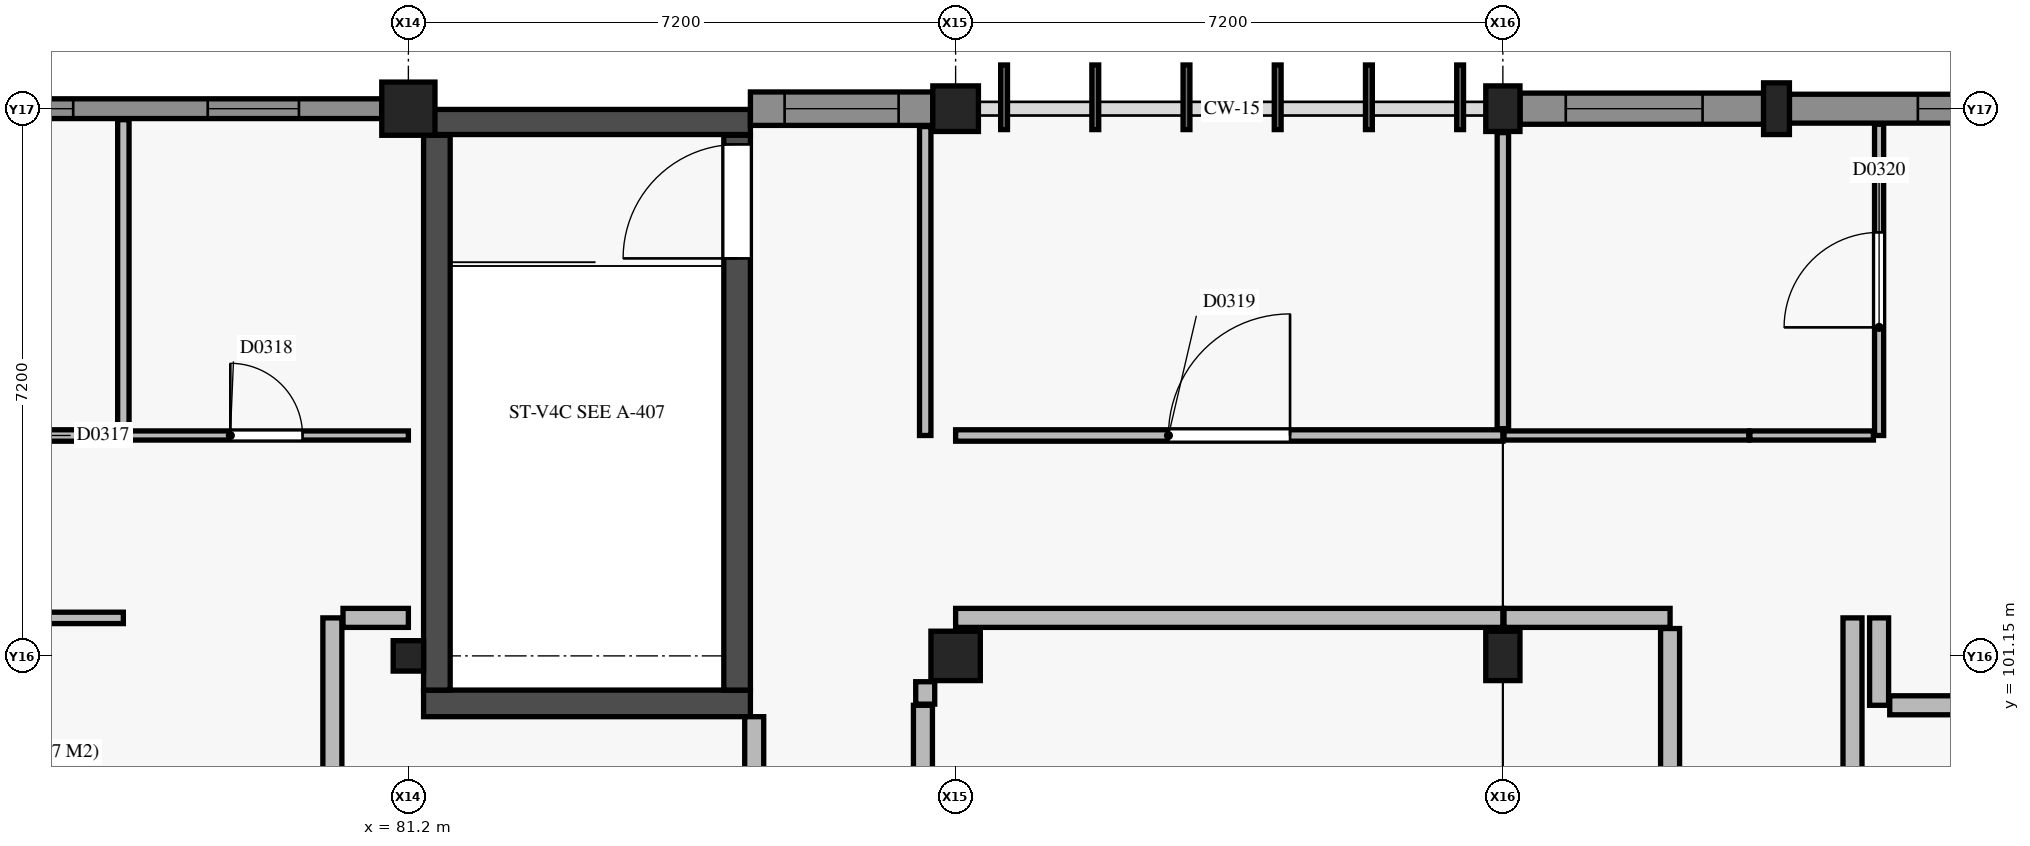
"""IFC4 building model, lengths in metres.
Left out: names, types, materials, properties, quantities, classifications, styles, units other than length and angle.
Written with IfcOpenShell. Run it as: python <this file> out.ifc"""

import sys

from ifc_helpers import new_model, si_unit, direction, frame, frame_2d, origin, origin_2d, place, context, subcontext, project, spatial, rectangle, circle, extrude, element, fill, save


model = new_model("IFC4")
c1 = context("Model", 3, precision=1e-05, world=origin(), true_north=direction((0.0, 1.0)))
c2 = subcontext(c1, "Body", "Model", "MODEL_VIEW")
j1 = project(units=[si_unit("LENGTHUNIT", "METRE"), si_unit("PLANEANGLEUNIT", "RADIAN")], contexts=[c1])
p1 = place(None, origin())
s1 = spatial("IfcSite", under=j1, at=p1, CompositionType="ELEMENT")
p2 = place(p1, origin())
s2 = spatial("IfcBuilding", under=s1, at=p2, CompositionType="ELEMENT")
p3 = place(p2, frame((0.0, 0.0, 21.6)))
s3 = spatial("IfcBuildingStorey", under=s2, at=p3, CompositionType="ELEMENT", Elevation=21.6)
p4 = place(p3, frame((81.2, 101.15, 0.0), z_axis=(0.0, 0.0, 1.0), x_axis=(1.0, 0.0, 0.0)))
e1 = element("IfcColumn", 1, at=p4, inside=s3, PredefinedType="COLUMN", context=c2, shape_type="SweptSolid", body=[
    extrude(rectangle(XDim=0.4, YDim=0.4, at=origin_2d()), origin(), (0.0, 0.0, 1.0), 4.05),
])
p5 = place(p3, frame((81.2, 108.35, 0.0), z_axis=(0.0, 0.0, 1.0), x_axis=(1.0, 0.0, 0.0)))
e2 = element("IfcColumn", 2, at=p5, inside=s3, PredefinedType="COLUMN", context=c2, shape_type="SweptSolid", body=[
    extrude(circle(Radius=0.35, at=origin_2d()), origin(), (0.0, 0.0, 1.0), 4.36),
])
p6 = place(p3, frame((88.4, 101.15, 0.0), z_axis=(0.0, 0.0, 1.0), x_axis=(1.0, 0.0, 0.0)))
e3 = element("IfcColumn", 3, at=p6, inside=s3, PredefinedType="COLUMN", context=c2, shape_type="SweptSolid", body=[
    extrude(rectangle(XDim=0.65, YDim=0.65, at=origin_2d()), origin(), (0.0, 0.0, 1.0), 4.05),
])
p7 = place(p3, frame((88.4, 108.35, 0.0), z_axis=(0.0, 0.0, 1.0), x_axis=(1.0, 0.0, 0.0)))
e4 = element("IfcColumn", 4, at=p7, inside=s3, PredefinedType="COLUMN", context=c2, shape_type="SweptSolid", body=[
    extrude(rectangle(XDim=0.6, YDim=0.6, at=origin_2d()), origin(), (0.0, 0.0, 1.0), 4.36),
])
p8 = place(p3, frame((95.6, 101.15, 0.0), z_axis=(0.0, 0.0, 1.0), x_axis=(1.0, 0.0, 0.0)))
e5 = element("IfcColumn", 5, at=p8, inside=s3, PredefinedType="COLUMN", context=c2, shape_type="SweptSolid", body=[
    extrude(rectangle(XDim=0.45, YDim=0.65, at=origin_2d()), origin(), (0.0, 0.0, 1.0), 4.05),
])
p9 = place(p3, frame((95.6, 108.35, 0.0), z_axis=(0.0, 0.0, 1.0), x_axis=(1.0, 0.0, 0.0)))
e6 = element("IfcColumn", 6, at=p9, inside=s3, PredefinedType="COLUMN", context=c2, shape_type="SweptSolid", body=[
    extrude(rectangle(XDim=0.45, YDim=0.6, at=origin_2d()), origin(), (0.0, 0.0, 1.0), 4.36),
])
p10 = place(p3, frame((99.2, 108.35, 0.0), z_axis=(0.0, 0.0, 1.0), x_axis=(1.0, 0.0, 0.0)))
e7 = element("IfcColumn", 7, at=p10, inside=s3, PredefinedType="PILASTER", context=c2, shape_type="SweptSolid", body=[
    extrude(rectangle(XDim=0.34, YDim=0.68, at=origin_2d()), origin(), (0.0, 0.0, 1.0), 4.2),
])
p11 = place(p3, frame((81.4, 100.525, 0.0), z_axis=(0.0, 0.0, 1.0), x_axis=(1.0, 0.0, 0.0)))
e8 = element("IfcWall", 8, at=p11, inside=s3, PredefinedType="SHEAR", context=c2, shape_type="SweptSolid", body=[
    extrude(rectangle(XDim=4.3, YDim=0.35, at=frame_2d((2.15, 0.0))), origin(), (0.0, 0.0, 1.0), 4.02),
])
p12 = place(p3, frame((81.4, 108.175, 0.0), z_axis=(0.0, 0.0, 1.0), x_axis=(1.0, 0.0, 0.0)))
e9 = element("IfcWall", 9, at=p12, inside=s3, PredefinedType="SHEAR", context=c2, shape_type="SweptSolid", body=[
    extrude(rectangle(XDim=4.3, YDim=0.33, at=frame_2d((2.15, 0.0))), origin(), (0.0, 0.0, 1.0), 4.02),
])
p13 = place(p3, frame((81.575, 100.7, 0.0), z_axis=(0.0, 0.0, 1.0), x_axis=(0.0, 1.0, 0.0)))
e10 = element("IfcWall", 10, at=p13, inside=s3, PredefinedType="SHEAR", context=c2, shape_type="SweptSolid", body=[
    extrude(rectangle(XDim=7.3, YDim=0.35, at=frame_2d((3.65, 0.0))), origin(), (0.0, 0.0, 1.0), 4.02),
])
p14 = place(p3, frame((85.525, 100.7, 0.0), z_axis=(0.0, 0.0, 1.0), x_axis=(0.0, 1.0, 0.0)))
e11 = element("IfcWall", 11, at=p14, inside=s3, PredefinedType="SHEAR", context=c2, shape_type="SweptSolid", body=[
    extrude(rectangle(XDim=7.3, YDim=0.35, at=frame_2d((3.65, 0.0))), origin(), (0.0, 0.0, 1.0), 4.02),
])
p15 = place(p14, frame((5.68, 0.0, 0.0)))
e12 = element("IfcOpeningElement", 12, at=p15, cuts=e11, PredefinedType="OPENING", context=c2, shape_type="SweptSolid", body=[
    extrude(rectangle(XDim=1.5, YDim=2.15, at=frame_2d((0.75, 1.075))), frame((0.0, 0.185, 0.0), z_axis=(0.0, -1.0, 0.0), x_axis=(1.0, 0.0, 0.0)), (0.0, 0.0, 1.0), 0.37),
])
p16 = place(p3, frame((74.35, 108.35, 0.0), z_axis=(0.0, 0.0, 1.0), x_axis=(1.0, 0.0, 0.0)))
e13 = element("IfcWall", 13, at=p16, inside=s3, PredefinedType="SOLIDWALL", context=c2, shape_type="SweptSolid", body=[
    extrude(rectangle(XDim=6.5, YDim=0.26, at=frame_2d((3.25, 0.0))), origin(), (0.0, 0.0, 1.0), 3.38),
])
p17 = place(p16, frame((0.64, 0.0, 0.9)))
e14 = element("IfcOpeningElement", 14, at=p17, cuts=e13, PredefinedType="OPENING", context=c2, shape_type="SweptSolid", body=[
    extrude(rectangle(XDim=1.8, YDim=1.8, at=frame_2d((0.9, 0.9))), frame((0.0, 0.14, 0.0), z_axis=(0.0, -1.0, 0.0), x_axis=(1.0, 0.0, 0.0)), (0.0, 0.0, 1.0), 0.28),
])
p18 = place(p16, frame((4.21, 0.0, 0.9)))
e15 = element("IfcOpeningElement", 15, at=p18, cuts=e13, PredefinedType="OPENING", context=c2, shape_type="SweptSolid", body=[
    extrude(rectangle(XDim=1.2, YDim=1.5, at=frame_2d((0.6, 0.75))), frame((0.0, 0.14, 0.0), z_axis=(0.0, -1.0, 0.0), x_axis=(1.0, 0.0, 0.0)), (0.0, 0.0, 1.0), 0.28),
])
p19 = place(p3, frame((85.7, 108.35, 0.0), z_axis=(0.0, 0.0, 1.0), x_axis=(1.0, 0.0, 0.0)))
e16 = element("IfcWall", 16, at=p19, inside=s3, PredefinedType="USERDEFINED", context=c2, shape_type="SweptSolid", body=[
    extrude(rectangle(XDim=2.4, YDim=0.44, at=frame_2d((1.2, 0.0))), origin(), (0.0, 0.0, 1.0), 3.3),
])
p20 = place(p19, frame((0.45, 0.0, 0.9)))
e17 = element("IfcOpeningElement", 17, at=p20, cuts=e16, PredefinedType="OPENING", context=c2, shape_type="SweptSolid", body=[
    extrude(rectangle(XDim=1.5, YDim=1.5, at=frame_2d((0.75, 0.75))), frame((0.0, 0.23, 0.0), z_axis=(0.0, -1.0, 0.0), x_axis=(1.0, 0.0, 0.0)), (0.0, 0.0, 1.0), 0.46),
])
p21 = place(p3, frame((95.825, 108.35, 0.0), z_axis=(0.0, 0.0, 1.0), x_axis=(1.0, 0.0, 0.0)))
e18 = element("IfcWall", 18, at=p21, inside=s3, PredefinedType="USERDEFINED", context=c2, shape_type="SweptSolid", body=[
    extrude(rectangle(XDim=3.205, YDim=0.41, at=frame_2d((1.603, 0.0))), origin(), (0.0, 0.0, 1.0), 3.38),
])
p22 = place(p21, frame((0.603, 0.0, 0.9)))
e19 = element("IfcOpeningElement", 19, at=p22, cuts=e18, PredefinedType="OPENING", context=c2, shape_type="SweptSolid", body=[
    extrude(rectangle(XDim=1.8, YDim=1.5, at=frame_2d((0.9, 0.75))), frame((0.0, 0.215, 0.0), z_axis=(0.0, -1.0, 0.0), x_axis=(1.0, 0.0, 0.0)), (0.0, 0.0, 1.0), 0.43),
])
p23 = place(p3, frame((99.37, 108.35, 0.0), z_axis=(0.0, 0.0, 1.0), x_axis=(1.0, 0.0, 0.0)))
e20 = element("IfcWall", 20, at=p23, inside=s3, PredefinedType="USERDEFINED", context=c2, shape_type="SweptSolid", body=[
    extrude(rectangle(XDim=3.08, YDim=0.38, at=frame_2d((1.54, 0.0))), origin(), (0.0, 0.0, 1.0), 3.38),
])
p24 = place(p23, frame((1.69, 0.0, 0.95)))
e21 = element("IfcOpeningElement", 21, at=p24, cuts=e20, PredefinedType="OPENING", context=c2, shape_type="SweptSolid", body=[
    extrude(rectangle(XDim=0.9, YDim=1.2, at=frame_2d((0.45, 0.6))), frame((0.0, 0.2, 0.0), z_axis=(0.0, -1.0, 0.0), x_axis=(1.0, 0.0, 0.0)), (0.0, 0.0, 1.0), 0.4),
])
p25 = place(p3, frame((87.97, 99.365, 0.0), z_axis=(0.0, 0.0, 1.0), x_axis=(0.0, 1.0, 0.0)))
e22 = element("IfcWall", 22, at=p25, inside=s3, PredefinedType="PARTITIONING", context=c2, shape_type="SweptSolid", body=[
    extrude(rectangle(XDim=1.135, YDim=0.25, at=frame_2d((0.567, 0.0))), origin(), (0.0, 0.0, 1.0), 3.95),
])
p26 = place(p3, frame((88.0, 100.515, 0.0), z_axis=(0.0, 0.0, 1.0), x_axis=(0.0, 1.0, 0.0)))
e23 = element("IfcWall", 23, at=p26, inside=s3, PredefinedType="PARTITIONING", context=c2, shape_type="SweptSolid", body=[
    extrude(rectangle(XDim=0.295, YDim=0.25, at=frame_2d((0.147, 0.0))), origin(), (0.0, 0.0, 1.0), 3.95),
])
p27 = place(p3, frame((88.4, 101.65, 0.0), z_axis=(0.0, 0.0, 1.0), x_axis=(1.0, 0.0, 0.0)))
e24 = element("IfcWall", 24, at=p27, inside=s3, PredefinedType="PARTITIONING", context=c2, shape_type="SweptSolid", body=[
    extrude(rectangle(XDim=7.2, YDim=0.25, at=frame_2d((3.6, 0.0))), origin(), (0.0, 0.0, 1.0), 3.32),
])
p28 = place(p3, frame((95.615, 101.65, 0.0), z_axis=(0.0, 0.0, 1.0), x_axis=(1.0, 0.0, 0.0)))
e25 = element("IfcWall", 25, at=p28, inside=s3, PredefinedType="PARTITIONING", context=c2, shape_type="SweptSolid", body=[
    extrude(rectangle(XDim=2.185, YDim=0.25, at=frame_2d((1.093, 0.0))), origin(), (0.0, 0.0, 1.0), 3.32),
])
p29 = place(p3, frame((97.8, 98.75, 0.0), z_axis=(0.0, 0.0, 1.0), x_axis=(0.0, 1.0, 0.0)))
e26 = element("IfcWall", 26, at=p29, inside=s3, PredefinedType="PARTITIONING", context=c2, shape_type="SweptSolid", body=[
    extrude(rectangle(XDim=2.76, YDim=0.25, at=frame_2d((1.38, 0.0))), origin(), (0.0, 0.0, 1.0), 3.44),
])
p30 = place(p3, frame((85.75, 91.55, 0.0), z_axis=(0.0, 0.0, 1.0), x_axis=(0.0, 1.0, 0.0)))
e27 = element("IfcWall", 27, at=p30, inside=s3, PredefinedType="PARTITIONING", context=c2, shape_type="SweptSolid", body=[
    extrude(rectangle(XDim=8.8, YDim=0.25, at=frame_2d((4.4, 0.0))), origin(), (0.0, 0.0, 1.0), 3.5),
])
p31 = place(p3, frame((80.2, 91.69, 0.0), z_axis=(0.0, 0.0, 1.0), x_axis=(0.0, 1.0, 0.0)))
e28 = element("IfcWall", 28, at=p31, inside=s3, PredefinedType="PARTITIONING", context=c2, shape_type="SweptSolid", body=[
    extrude(rectangle(XDim=9.96, YDim=0.25, at=frame_2d((4.98, 0.0))), origin(), (0.0, 0.0, 1.0), 3.3),
])
p32 = place(p31, frame((3.98, 0.0, 0.0)))
e29 = element("IfcOpeningElement", 29, at=p32, cuts=e28, PredefinedType="OPENING", context=c2, shape_type="SweptSolid", body=[
    extrude(rectangle(XDim=2.0, YDim=2.4, at=frame_2d((1.0, 1.2))), frame((0.0, 0.135, 0.0), z_axis=(0.0, -1.0, 0.0), x_axis=(1.0, 0.0, 0.0)), (0.0, 0.0, 1.0), 0.27),
])
p33 = place(p3, frame((80.34, 101.65, 0.0), z_axis=(0.0, 0.0, 1.0), x_axis=(1.0, 0.0, 0.0)))
e30 = element("IfcWall", 30, at=p33, inside=s3, PredefinedType="PARTITIONING", context=c2, shape_type="SweptSolid", body=[
    extrude(rectangle(XDim=0.86, YDim=0.25, at=frame_2d((0.43, 0.0))), origin(), (0.0, 0.0, 1.0), 3.44),
])
p34 = place(p3, frame((100.55, 100.5, 0.0), z_axis=(0.0, 0.0, 1.0), x_axis=(0.0, 1.0, 0.0)))
e31 = element("IfcWall", 31, at=p34, inside=s3, PredefinedType="PARTITIONING", context=c2, shape_type="SweptSolid", body=[
    extrude(rectangle(XDim=1.15, YDim=0.25, at=frame_2d((0.575, 0.0))), origin(), (0.0, 0.0, 1.0), 3.44),
])
p35 = place(p3, frame((100.69, 100.5, 0.0), z_axis=(0.0, 0.0, 1.0), x_axis=(1.0, 0.0, 0.0)))
e32 = element("IfcWall", 32, at=p35, inside=s3, PredefinedType="PARTITIONING", context=c2, shape_type="SweptSolid", body=[
    extrude(rectangle(XDim=2.11, YDim=0.25, at=frame_2d((1.055, 0.0))), origin(), (0.0, 0.0, 1.0), 3.32),
])
p36 = place(p3, frame((100.2, 98.89, 0.0), z_axis=(0.0, 0.0, 1.0), x_axis=(0.0, 1.0, 0.0)))
e33 = element("IfcWall", 33, at=p36, inside=s3, PredefinedType="PARTITIONING", context=c2, shape_type="SweptSolid", body=[
    extrude(rectangle(XDim=2.76, YDim=0.25, at=frame_2d((1.38, 0.0))), origin(), (0.0, 0.0, 1.0), 3.44),
])
p37 = place(p3, frame((74.015, 101.65, 0.0), z_axis=(0.0, 0.0, 1.0), x_axis=(1.0, 0.0, 0.0)))
e34 = element("IfcWall", 34, at=p37, inside=s3, PredefinedType="PARTITIONING", context=c2, shape_type="SweptSolid", body=[
    extrude(rectangle(XDim=3.435, YDim=0.15, at=frame_2d((1.718, 0.0))), origin(), (0.0, 0.0, 1.0), 3.22),
])
p38 = place(p3, frame((74.015, 104.05, 0.0), z_axis=(0.0, 0.0, 1.0), x_axis=(1.0, 0.0, 0.0)))
e35 = element("IfcWall", 35, at=p38, inside=s3, PredefinedType="PARTITIONING", context=c2, shape_type="SweptSolid", body=[
    extrude(rectangle(XDim=3.435, YDim=0.15, at=frame_2d((1.718, 0.0))), origin(), (0.0, 0.0, 1.0), 3.22),
])
p39 = place(p38, frame((1.218, 0.0, 0.0)))
e36 = element("IfcOpeningElement", 36, at=p39, cuts=e35, PredefinedType="OPENING", context=c2, shape_type="SweptSolid", body=[
    extrude(rectangle(XDim=1.0, YDim=2.15, at=frame_2d((0.5, 1.075))), frame((0.0, 0.085, 0.0), z_axis=(0.0, -1.0, 0.0), x_axis=(1.0, 0.0, 0.0)), (0.0, 0.0, 1.0), 0.17),
])
p40 = place(p3, frame((88.0, 104.05, 0.0), z_axis=(0.0, 0.0, 1.0), x_axis=(0.0, 1.0, 0.0)))
e37 = element("IfcWall", 37, at=p40, inside=s3, PredefinedType="PARTITIONING", context=c2, shape_type="SweptSolid", body=[
    extrude(rectangle(XDim=4.065, YDim=0.15, at=frame_2d((2.032, 0.0))), origin(), (0.0, 0.0, 1.0), 3.95),
])
p41 = place(p3, frame((88.4, 104.05, 0.0), z_axis=(0.0, 0.0, 1.0), x_axis=(1.0, 0.0, 0.0)))
e38 = element("IfcWall", 38, at=p41, inside=s3, PredefinedType="PARTITIONING", context=c2, shape_type="SweptSolid", body=[
    extrude(rectangle(XDim=7.2, YDim=0.15, at=frame_2d((3.6, 0.0))), origin(), (0.0, 0.0, 1.0), 3.32),
])
p42 = place(p41, frame((2.8, 0.0, 0.0)))
e39 = element("IfcOpeningElement", 39, at=p42, cuts=e38, PredefinedType="OPENING", context=c2, shape_type="SweptSolid", body=[
    extrude(rectangle(XDim=1.6, YDim=2.25, at=frame_2d((0.8, 1.125))), frame((0.0, 0.085, 0.0), z_axis=(0.0, -1.0, 0.0), x_axis=(1.0, 0.0, 0.0)), (0.0, 0.0, 1.0), 0.17),
])
p43 = place(p3, frame((77.465, 104.05, 0.0), z_axis=(0.0, 0.0, 1.0), x_axis=(1.0, 0.0, 0.0)))
e40 = element("IfcWall", 40, at=p43, inside=s3, PredefinedType="PARTITIONING", context=c2, shape_type="SweptSolid", body=[
    extrude(rectangle(XDim=3.735, YDim=0.12, at=frame_2d((1.867, 0.0))), origin(), (0.0, 0.0, 1.0), 3.44),
])
p44 = place(p43, frame((1.393, 0.0, 0.0)))
e41 = element("IfcOpeningElement", 41, at=p44, cuts=e40, PredefinedType="OPENING", context=c2, shape_type="SweptSolid", body=[
    extrude(rectangle(XDim=0.95, YDim=2.1, at=frame_2d((0.475, 1.05))), frame((0.0, 0.07, 0.0), z_axis=(0.0, -1.0, 0.0), x_axis=(1.0, 0.0, 0.0)), (0.0, 0.0, 1.0), 0.14),
])
p45 = place(p3, frame((100.55, 104.05, 0.0), z_axis=(0.0, 0.0, 1.0), x_axis=(0.0, 1.0, 0.0)))
e42 = element("IfcWall", 42, at=p45, inside=s3, PredefinedType="PARTITIONING", context=c2, shape_type="SweptSolid", body=[
    extrude(rectangle(XDim=4.095, YDim=0.12, at=frame_2d((2.047, 0.0))), origin(), (0.0, 0.0, 1.0), 3.95),
])
p46 = place(p45, frame((1.423, 0.0, 0.0)))
e43 = element("IfcOpeningElement", 43, at=p46, cuts=e42, PredefinedType="OPENING", context=c2, shape_type="SweptSolid", body=[
    extrude(rectangle(XDim=1.25, YDim=2.15, at=frame_2d((0.625, 1.075))), frame((0.0, 0.07, 0.0), z_axis=(0.0, -1.0, 0.0), x_axis=(1.0, 0.0, 0.0)), (0.0, 0.0, 1.0), 0.14),
])
p47 = place(p3, frame((98.85, 104.05, 0.0), z_axis=(0.0, 0.0, 1.0), x_axis=(1.0, 0.0, 0.0)))
e44 = element("IfcWall", 44, at=p47, inside=s3, PredefinedType="PARTITIONING", context=c2, shape_type="SweptSolid", body=[
    extrude(rectangle(XDim=1.625, YDim=0.12, at=frame_2d((0.812, 0.0))), origin(), (0.0, 0.0, 1.0), 3.95),
])
p48 = place(p3, frame((95.615, 104.05, 0.0), z_axis=(0.0, 0.0, 1.0), x_axis=(1.0, 0.0, 0.0)))
e45 = element("IfcWall", 45, at=p48, inside=s3, PredefinedType="PARTITIONING", context=c2, shape_type="SweptSolid", body=[
    extrude(rectangle(XDim=3.22, YDim=0.12, at=frame_2d((1.61, 0.0))), origin(), (0.0, 0.0, 1.0), 3.32),
])
p49 = place(p3, frame((77.45, 104.14, 0.0), z_axis=(0.0, 0.0, 1.0), x_axis=(0.0, 1.0, 0.0)))
e46 = element("IfcWall", 46, at=p49, inside=s3, PredefinedType="PARTITIONING", context=c2, shape_type="SweptSolid", body=[
    extrude(rectangle(XDim=4.065, YDim=0.15, at=frame_2d((2.033, 0.0))), origin(), (0.0, 0.0, 1.0), 3.95),
])
p50 = place(p3, frame((95.6, 104.14, 0.0), z_axis=(0.0, 0.0, 1.0), x_axis=(0.0, 1.0, 0.0)))
e47 = element("IfcWall", 47, at=p50, inside=s3, PredefinedType="PARTITIONING", context=c2, shape_type="SweptSolid", body=[
    extrude(rectangle(XDim=3.895, YDim=0.15, at=frame_2d((1.948, 0.0))), origin(), (0.0, 0.0, 1.0), 3.32),
])
p51 = place(p17, origin())
e48 = element("IfcWindow", 48, at=p51, inside=s3, PartitioningType="SINGLE_PANEL", PredefinedType="WINDOW", context=c2, shape_type="SweptSolid", body=[
    extrude(rectangle(XDim=1.8, YDim=1.8, at=frame_2d((0.9, 0.9))), frame((0.0, 0.03, 0.0), z_axis=(0.0, -1.0, 0.0), x_axis=(1.0, 0.0, 0.0)), (0.0, 0.0, 1.0), 0.06),
])
fill(e14, e48)
p52 = place(p18, origin())
e49 = element("IfcWindow", 49, at=p52, inside=s3, PartitioningType="SINGLE_PANEL", PredefinedType="WINDOW", context=c2, shape_type="SweptSolid", body=[
    extrude(rectangle(XDim=1.2, YDim=1.5, at=frame_2d((0.6, 0.75))), frame((0.0, 0.03, 0.0), z_axis=(0.0, -1.0, 0.0), x_axis=(1.0, 0.0, 0.0)), (0.0, 0.0, 1.0), 0.06),
])
fill(e15, e49)
p53 = place(p20, origin())
e50 = element("IfcWindow", 50, at=p53, inside=s3, PartitioningType="SINGLE_PANEL", PredefinedType="WINDOW", context=c2, shape_type="SweptSolid", body=[
    extrude(rectangle(XDim=1.5, YDim=1.5, at=frame_2d((0.75, 0.75))), frame((0.0, 0.03, 0.0), z_axis=(0.0, -1.0, 0.0), x_axis=(1.0, 0.0, 0.0)), (0.0, 0.0, 1.0), 0.06),
])
fill(e17, e50)
p54 = place(p22, origin())
e51 = element("IfcWindow", 51, at=p54, inside=s3, PartitioningType="SINGLE_PANEL", PredefinedType="WINDOW", context=c2, shape_type="SweptSolid", body=[
    extrude(rectangle(XDim=1.8, YDim=1.5, at=frame_2d((0.9, 0.75))), frame((0.0, 0.03, 0.0), z_axis=(0.0, -1.0, 0.0), x_axis=(1.0, 0.0, 0.0)), (0.0, 0.0, 1.0), 0.06),
])
fill(e19, e51)
p55 = place(p24, origin())
e52 = element("IfcWindow", 52, at=p55, inside=s3, PartitioningType="SINGLE_PANEL", PredefinedType="WINDOW", context=c2, shape_type="SweptSolid", body=[
    extrude(rectangle(XDim=0.9, YDim=1.2, at=frame_2d((0.45, 0.6))), frame((0.0, 0.03, 0.0), z_axis=(0.0, -1.0, 0.0), x_axis=(1.0, 0.0, 0.0)), (0.0, 0.0, 1.0), 0.06),
])
fill(e21, e52)
p56 = place(p15, origin())
e53 = element("IfcDoor", 53, at=p56, inside=s3, OperationType="SINGLE_SWING_LEFT", PredefinedType="DOOR", context=c2, shape_type="SweptSolid", body=[
    extrude(rectangle(XDim=1.5, YDim=2.15, at=frame_2d((0.75, 1.075))), frame((0.0, 0.025, 0.0), z_axis=(0.0, -1.0, 0.0), x_axis=(1.0, 0.0, 0.0)), (0.0, 0.0, 1.0), 0.05),
])
fill(e12, e53)
p57 = place(p44, origin())
e54 = element("IfcDoor", 54, at=p57, inside=s3, OperationType="SINGLE_SWING_LEFT", PredefinedType="DOOR", context=c2, shape_type="SweptSolid", body=[
    extrude(rectangle(XDim=0.95, YDim=2.1, at=frame_2d((0.475, 1.05))), frame((0.0, 0.025, 0.0), z_axis=(0.0, -1.0, 0.0), x_axis=(1.0, 0.0, 0.0)), (0.0, 0.0, 1.0), 0.05),
])
fill(e41, e54)
p58 = place(p42, origin())
e55 = element("IfcDoor", 55, at=p58, inside=s3, OperationType="SINGLE_SWING_RIGHT", PredefinedType="DOOR", context=c2, shape_type="SweptSolid", body=[
    extrude(rectangle(XDim=1.6, YDim=2.25, at=frame_2d((0.8, 1.125))), frame((0.0, 0.025, 0.0), z_axis=(0.0, -1.0, 0.0), x_axis=(1.0, 0.0, 0.0)), (0.0, 0.0, 1.0), 0.05),
])
fill(e39, e55)
p59 = place(p46, origin())
e56 = element("IfcDoor", 56, at=p59, inside=s3, OperationType="SINGLE_SWING_LEFT", PredefinedType="DOOR", context=c2, shape_type="SweptSolid", body=[
    extrude(rectangle(XDim=1.25, YDim=2.15, at=frame_2d((0.625, 1.075))), frame((0.0, 0.025, 0.0), z_axis=(0.0, -1.0, 0.0), x_axis=(1.0, 0.0, 0.0)), (0.0, 0.0, 1.0), 0.05),
])
fill(e43, e56)
save(model, sys.argv[1])
